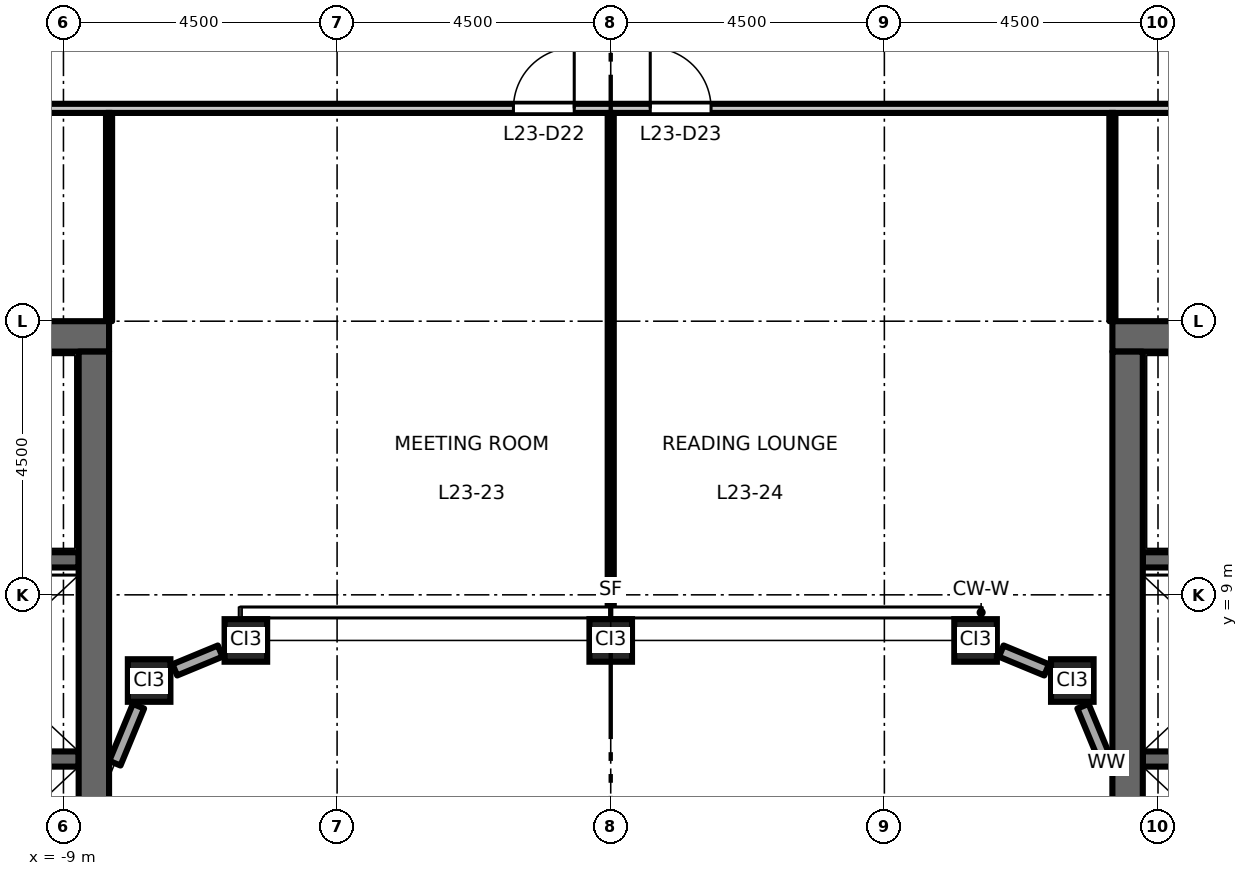
"""IFC4 building model, lengths in metres.
Left out: names, types, materials, properties, quantities, classifications, styles, units other than length and angle.
Written with IfcOpenShell. Run it as: python <this file> out.ifc"""

import sys

from ifc_helpers import new_model, si_unit, direction, frame, frame_2d, origin, origin_2d, place, context, subcontext, project, spatial, rectangle, hollow_rectangle, extrude, element, fill, save


model = new_model("IFC4")
c1 = context("Model", 3, precision=1e-05, world=origin(), true_north=direction((0.0, 1.0)))
c2 = subcontext(c1, "Body", "Model", "MODEL_VIEW")
j1 = project(units=[si_unit("LENGTHUNIT", "METRE"), si_unit("PLANEANGLEUNIT", "RADIAN")], contexts=[c1])
p1 = place(None, origin())
s1 = spatial("IfcSite", under=j1, at=p1, CompositionType="ELEMENT")
p2 = place(p1, origin())
s2 = spatial("IfcBuilding", under=s1, at=p2, CompositionType="ELEMENT")
p3 = place(p2, frame((0.0, 0.0, 109.2)))
s3 = spatial("IfcBuildingStorey", under=s2, at=p3, CompositionType="ELEMENT", Elevation=109.2)
for number, where, z_axis, x_axis in (
    (1, (-7.591, 7.591, 0.0), (0.0, 0.0, 1.0), (1.0, 0.0, 0.0)),
    (2, (-6.0, 8.25, 0.0), (0.0, 0.0, 1.0), (1.0, 0.0, 0.0)),
    (3, (0.0, 8.25, 0.0), (0.0, 0.0, 1.0), (1.0, 0.0, 0.0)),
    (4, (6.0, 8.25, 0.0), (0.0, 0.0, 1.0), (1.0, 0.0, 0.0)),
    (5, (7.591, 7.591, 0.0), (0.0, 0.0, 1.0), (1.0, 0.0, 0.0)),
):
    element("IfcColumn", number, at=place(p3, frame(where, z_axis=z_axis, x_axis=x_axis)), inside=s3, PredefinedType="COLUMN", context=c2, shape_type="SweptSolid", body=[
        extrude(hollow_rectangle(XDim=0.7, YDim=0.7, WallThickness=0.04, at=origin_2d()), origin(), (0.0, 0.0, 1.0), 4.5),
    ])
p4 = place(p3, frame((-8.75, 6.3, 0.0), z_axis=(0.0, 0.0, 1.0), x_axis=(-1.0, 0.0, 0.0)))
e6 = element("IfcWall", 6, at=p4, inside=s3, PredefinedType="SHEAR", context=c2, shape_type="SweptSolid", body=[
    extrude(rectangle(XDim=3.1, YDim=0.25, at=frame_2d((1.55, 0.0))), origin(), (0.0, 0.0, 1.0), 4.35),
])
p5 = place(p3, frame((-8.75, 9.575, 0.0), z_axis=(0.0, 0.0, 1.0), x_axis=(-1.0, 0.0, 0.0)))
e7 = element("IfcWall", 7, at=p5, inside=s3, PredefinedType="SHEAR", context=c2, shape_type="SweptSolid", body=[
    extrude(rectangle(XDim=8.0, YDim=0.25, at=frame_2d((4.0, 0.0))), origin(), (0.0, 0.0, 1.0), 4.35),
])
p6 = place(p5, frame((6.65, 0.0, 0.0)))
e8 = element("IfcOpeningElement", 8, at=p6, cuts=e7, PredefinedType="OPENING", context=c2, shape_type="SweptSolid", body=[
    extrude(rectangle(XDim=1.1, YDim=2.1, at=frame_2d((0.55, 1.05))), frame((0.0, 0.135, 0.0), z_axis=(0.0, -1.0, 0.0), x_axis=(1.0, 0.0, 0.0)), (0.0, 0.0, 1.0), 0.27),
])
p7 = place(p3, frame((-8.25, 13.25, 0.0), z_axis=(0.0, 0.0, 1.0), x_axis=(-1.0, 0.0, 0.0)))
e9 = element("IfcWall", 9, at=p7, inside=s3, PredefinedType="SHEAR", context=c2, shape_type="SweptSolid", body=[
    extrude(rectangle(XDim=13.5, YDim=0.5, at=frame_2d((6.75, 0.0))), origin(), (0.0, 0.0, 1.0), 4.35),
])
p8 = place(p3, frame((-8.5, -13.0, 0.0), z_axis=(0.0, 0.0, 1.0), x_axis=(0.0, 1.0, 0.0)))
e10 = element("IfcWall", 10, at=p8, inside=s3, PredefinedType="SHEAR", context=c2, shape_type="SweptSolid", body=[
    extrude(rectangle(XDim=26.0, YDim=0.5, at=frame_2d((13.0, 0.0))), origin(), (0.0, 0.0, 1.0), 4.35),
])
p9 = place(p3, frame((8.75, 6.3, 0.0), z_axis=(0.0, 0.0, 1.0), x_axis=(1.0, 0.0, 0.0)))
e11 = element("IfcWall", 11, at=p9, inside=s3, PredefinedType="SHEAR", context=c2, shape_type="SweptSolid", body=[
    extrude(rectangle(XDim=3.1, YDim=0.25, at=frame_2d((1.55, 0.0))), origin(), (0.0, 0.0, 1.0), 4.35),
])
p10 = place(p3, frame((8.75, 9.575, 0.0), z_axis=(0.0, 0.0, 1.0), x_axis=(1.0, 0.0, 0.0)))
e12 = element("IfcWall", 12, at=p10, inside=s3, PredefinedType="SHEAR", context=c2, shape_type="SweptSolid", body=[
    extrude(rectangle(XDim=8.0, YDim=0.25, at=frame_2d((4.0, 0.0))), origin(), (0.0, 0.0, 1.0), 4.35),
])
p11 = place(p10, frame((6.65, 0.0, 0.0)))
e13 = element("IfcOpeningElement", 13, at=p11, cuts=e12, PredefinedType="OPENING", context=c2, shape_type="SweptSolid", body=[
    extrude(rectangle(XDim=1.1, YDim=2.1, at=frame_2d((0.55, 1.05))), frame((0.0, 0.135, 0.0), z_axis=(0.0, -1.0, 0.0), x_axis=(1.0, 0.0, 0.0)), (0.0, 0.0, 1.0), 0.27),
])
p12 = place(p3, frame((8.25, 13.25, 0.0), z_axis=(0.0, 0.0, 1.0), x_axis=(1.0, 0.0, 0.0)))
e14 = element("IfcWall", 14, at=p12, inside=s3, PredefinedType="SHEAR", context=c2, shape_type="SweptSolid", body=[
    extrude(rectangle(XDim=13.5, YDim=0.5, at=frame_2d((6.75, 0.0))), origin(), (0.0, 0.0, 1.0), 4.35),
])
p13 = place(p3, frame((8.5, -13.0, 0.0), z_axis=(0.0, 0.0, 1.0), x_axis=(0.0, 1.0, 0.0)))
e15 = element("IfcWall", 15, at=p13, inside=s3, PredefinedType="SHEAR", context=c2, shape_type="SweptSolid", body=[
    extrude(rectangle(XDim=26.0, YDim=0.5, at=frame_2d((13.0, 0.0))), origin(), (0.0, 0.0, 1.0), 4.35),
])
p14 = place(p3, frame((8.154, 6.231, 0.0), z_axis=(0.0, 0.0, 1.0), x_axis=(-0.382769662028, 0.923843810301, 0.0)))
e16 = element("IfcWall", 16, at=p14, inside=s3, PredefinedType="STANDARD", context=c2, shape_type="SweptSolid", body=[
    extrude(rectangle(XDim=1.015, YDim=0.2, at=frame_2d((0.507, 0.0))), origin(), (0.0, 0.0, 1.0), 3.826),
])
for number, where, z_axis, x_axis in (
    (17, (7.168, 7.766, 0.0), (0.0, 0.0, 1.0), (-0.924, 0.383, 0.0)),
    (18, (-6.423, 8.075, 0.0), (0.0, 0.0, 1.0), (-0.924, -0.383, 0.0)),
):
    element("IfcWall", number, at=place(p3, frame(where, z_axis=z_axis, x_axis=x_axis)), inside=s3, PredefinedType="STANDARD", context=c2, shape_type="SweptSolid", body=[
        extrude(rectangle(XDim=0.807, YDim=0.2, at=frame_2d((0.404, 0.0))), origin(), (0.0, 0.0, 1.0), 3.826),
    ])
p15 = place(p3, frame((-7.766, 7.168, 0.0), z_axis=(0.0, 0.0, 1.0), x_axis=(-0.382769662028, -0.923843810301, 0.0)))
e19 = element("IfcWall", 19, at=p15, inside=s3, PredefinedType="STANDARD", context=c2, shape_type="SweptSolid", body=[
    extrude(rectangle(XDim=1.015, YDim=0.2, at=frame_2d((0.507, 0.0))), origin(), (0.0, 0.0, 1.0), 3.826),
])
p16 = place(p3, frame((-21.825, 17.0, 0.0), z_axis=(0.0, 0.0, 1.0), x_axis=(1.0, 0.0, 0.0)))
e20 = element("IfcWall", 20, at=p16, inside=s3, PredefinedType="PARTITIONING", context=c2, shape_type="SweptSolid", body=[
    extrude(rectangle(XDim=43.65, YDim=0.15, at=frame_2d((21.825, 0.0))), origin(), (0.0, 0.0, 1.0), 4.35),
])
p17 = place(p16, frame((20.225, 0.0, 0.0)))
e21 = element("IfcOpeningElement", 21, at=p17, cuts=e20, PredefinedType="OPENING", context=c2, shape_type="SweptSolid", body=[
    extrude(rectangle(XDim=1.0, YDim=2.1, at=frame_2d((0.5, 1.05))), frame((0.0, 0.085, 0.0), z_axis=(0.0, -1.0, 0.0), x_axis=(1.0, 0.0, 0.0)), (0.0, 0.0, 1.0), 0.17),
])
p18 = place(p16, frame((22.475, 0.0, 0.0)))
e22 = element("IfcOpeningElement", 22, at=p18, cuts=e20, PredefinedType="OPENING", context=c2, shape_type="SweptSolid", body=[
    extrude(rectangle(XDim=1.0, YDim=2.1, at=frame_2d((0.5, 1.05))), frame((0.0, 0.085, 0.0), z_axis=(0.0, -1.0, 0.0), x_axis=(1.0, 0.0, 0.0)), (0.0, 0.0, 1.0), 0.17),
])
p19 = place(p16, frame((0.725, 0.0, 0.0)))
e23 = element("IfcOpeningElement", 23, at=p19, cuts=e20, PredefinedType="OPENING", context=c2, shape_type="SweptSolid", body=[
    extrude(rectangle(XDim=1.0, YDim=2.1, at=frame_2d((0.5, 1.05))), frame((0.0, 0.085, 0.0), z_axis=(0.0, -1.0, 0.0), x_axis=(1.0, 0.0, 0.0)), (0.0, 0.0, 1.0), 0.17),
])
p20 = place(p16, frame((41.975, 0.0, 0.0)))
e24 = element("IfcOpeningElement", 24, at=p20, cuts=e20, PredefinedType="OPENING", context=c2, shape_type="SweptSolid", body=[
    extrude(rectangle(XDim=1.0, YDim=2.1, at=frame_2d((0.5, 1.05))), frame((0.0, 0.085, 0.0), z_axis=(0.0, -1.0, 0.0), x_axis=(1.0, 0.0, 0.0)), (0.0, 0.0, 1.0), 0.17),
])
p21 = place(p3, frame((-8.25, 13.5, 0.0), z_axis=(0.0, 0.0, 1.0), x_axis=(0.0, 1.0, 0.0)))
e25 = element("IfcWall", 25, at=p21, inside=s3, PredefinedType="PARTITIONING", context=c2, shape_type="SweptSolid", body=[
    extrude(rectangle(XDim=3.425, YDim=0.1, at=frame_2d((1.712, 0.0))), origin(), (0.0, 0.0, 1.0), 4.35),
])
p22 = place(p3, frame((0.0, 8.65, 0.0), z_axis=(0.0, 0.0, 1.0), x_axis=(0.0, 1.0, 0.0)))
e26 = element("IfcWall", 26, at=p22, inside=s3, PredefinedType="PARTITIONING", context=c2, shape_type="SweptSolid", body=[
    extrude(rectangle(XDim=8.275, YDim=0.1, at=frame_2d((4.138, 0.0))), origin(), (0.0, 0.0, 1.0), 3.45),
])
p23 = place(p3, frame((8.25, 13.5, 0.0), z_axis=(0.0, 0.0, 1.0), x_axis=(0.0, 1.0, 0.0)))
e27 = element("IfcWall", 27, at=p23, inside=s3, PredefinedType="PARTITIONING", context=c2, shape_type="SweptSolid", body=[
    extrude(rectangle(XDim=3.425, YDim=0.1, at=frame_2d((1.712, 0.0))), origin(), (0.0, 0.0, 1.0), 4.35),
])
p24 = place(p17, origin())
e28 = element("IfcDoor", 28, at=p24, inside=s3, OperationType="SINGLE_SWING_RIGHT", PredefinedType="DOOR", context=c2, shape_type="SweptSolid", body=[
    extrude(rectangle(XDim=1.0, YDim=2.1, at=frame_2d((0.5, 1.05))), frame((0.0, 0.025, 0.0), z_axis=(0.0, -1.0, 0.0), x_axis=(1.0, 0.0, 0.0)), (0.0, 0.0, 1.0), 0.05),
])
fill(e21, e28)
p25 = place(p18, origin())
e29 = element("IfcDoor", 29, at=p25, inside=s3, OperationType="SINGLE_SWING_LEFT", PredefinedType="DOOR", context=c2, shape_type="SweptSolid", body=[
    extrude(rectangle(XDim=1.0, YDim=2.1, at=frame_2d((0.5, 1.05))), frame((0.0, 0.025, 0.0), z_axis=(0.0, -1.0, 0.0), x_axis=(1.0, 0.0, 0.0)), (0.0, 0.0, 1.0), 0.05),
])
fill(e22, e29)
save(model, sys.argv[1])
